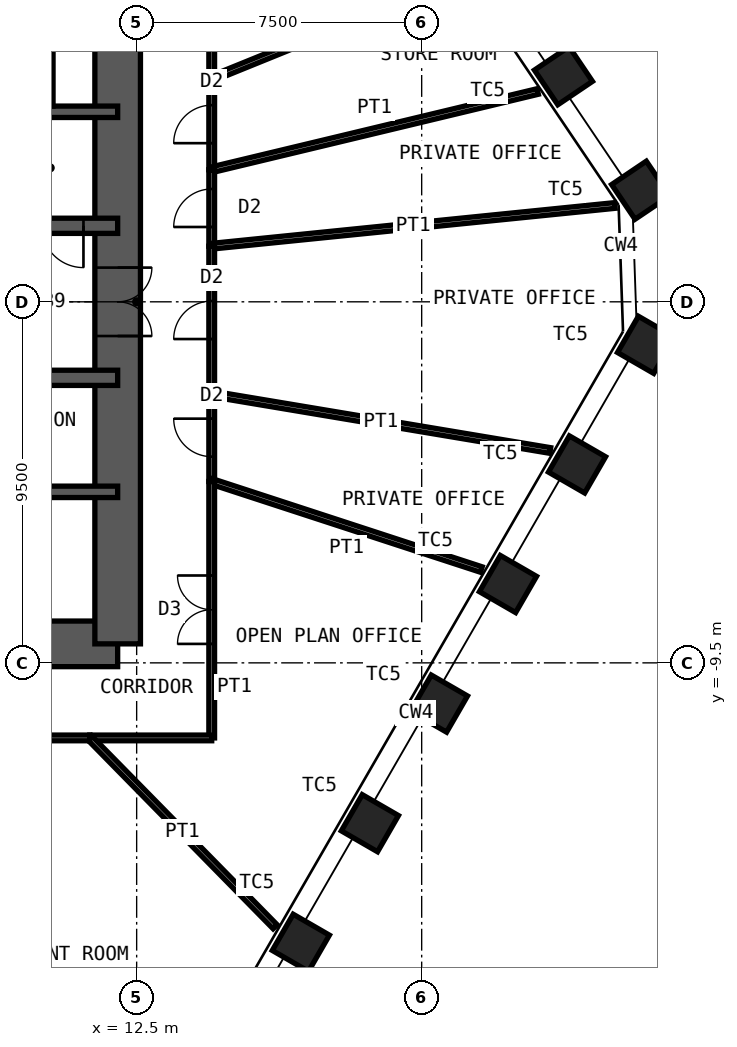
"""IFC4 building model, lengths in metres.
Left out: names, types, materials, properties, quantities, classifications, styles, units other than length and angle.
Written with IfcOpenShell. Run it as: python <this file> out.ifc"""

import sys

from ifc_helpers import new_model, si_unit, direction, frame, frame_2d, origin, origin_2d, place, context, subcontext, project, spatial, rectangle, hollow_rectangle, extrude, element, fill, save


model = new_model("IFC4")
c1 = context("Model", 3, precision=1e-05, world=origin(), true_north=direction((0.0, 1.0)))
c2 = subcontext(c1, "Body", "Model", "MODEL_VIEW")
j1 = project(units=[si_unit("LENGTHUNIT", "METRE"), si_unit("PLANEANGLEUNIT", "RADIAN")], contexts=[c1])
p1 = place(None, origin())
s1 = spatial("IfcSite", under=j1, at=p1, CompositionType="ELEMENT")
p2 = place(p1, origin())
s2 = spatial("IfcBuilding", under=s1, at=p2, CompositionType="ELEMENT")
p3 = place(p2, frame((0.0, 0.0, 214.0)))
s3 = spatial("IfcBuildingStorey", under=s2, at=p3, CompositionType="ELEMENT", Elevation=214.0)
for number, where, z_axis, x_axis in (
    (1, (23.731, 5.948, 0.0), (0.0, 0.0, 1.0), (-0.559, 0.829, 0.0)),
    (2, (25.762, 2.936, 0.0), (0.0, 0.0, 1.0), (-0.559, 0.829, 0.0)),
    (3, (25.905, -1.132, 0.0), (0.0, 0.0, 1.0), (0.5, 0.866, 0.0)),
    (4, (24.088, -4.279, 0.0), (0.0, 0.0, 1.0), (0.5, 0.866, 0.0)),
    (5, (22.271, -7.426, 0.0), (0.0, 0.0, 1.0), (0.5, 0.866, 0.0)),
    (6, (20.454, -10.572, 0.0), (0.0, 0.0, 1.0), (0.5, 0.866, 0.0)),
    (7, (18.637, -13.719, 0.0), (0.0, 0.0, 1.0), (0.5, 0.866, 0.0)),
    (8, (16.821, -16.866, 0.0), (0.0, 0.0, 1.0), (0.5, 0.866, 0.0)),
):
    element("IfcColumn", number, at=place(p3, frame(where, z_axis=z_axis, x_axis=x_axis)), inside=s3, PredefinedType="COLUMN", context=c2, shape_type="SweptSolid", body=[
        extrude(hollow_rectangle(XDim=1.1, YDim=1.1, WallThickness=0.07, at=origin_2d()), origin(), (0.0, 0.0, 1.0), 4.2),
    ])
p4 = place(p3, frame((-12.0, -9.0, 0.0), z_axis=(0.0, 0.0, 1.0), x_axis=(1.0, 0.0, 0.0)))
e9 = element("IfcWall", 9, at=p4, inside=s3, PredefinedType="SHEAR", context=c2, shape_type="SweptSolid", body=[
    extrude(rectangle(XDim=24.0, YDim=1.2, at=frame_2d((12.0, 0.0))), origin(), (0.0, 0.0, 1.0), 4.2),
])
p5 = place(p4, frame((1.35, 0.0, 0.0)))
e10 = element("IfcOpeningElement", 10, at=p5, cuts=e9, PredefinedType="OPENING", context=c2, shape_type="SweptSolid", body=[
    extrude(rectangle(XDim=1.0, YDim=2.1, at=frame_2d((0.5, 1.05))), frame((0.0, 0.61, 0.0), z_axis=(0.0, -1.0, 0.0), x_axis=(1.0, 0.0, 0.0)), (0.0, 0.0, 1.0), 1.22),
])
p6 = place(p4, frame((5.325, 0.0, 0.0)))
e11 = element("IfcOpeningElement", 11, at=p6, cuts=e9, PredefinedType="OPENING", context=c2, shape_type="SweptSolid", body=[
    extrude(rectangle(XDim=1.15, YDim=2.1, at=frame_2d((0.575, 1.05))), frame((0.0, 0.61, 0.0), z_axis=(0.0, -1.0, 0.0), x_axis=(1.0, 0.0, 0.0)), (0.0, 0.0, 1.0), 1.22),
])
p7 = place(p4, frame((12.6, 0.0, 0.0)))
e12 = element("IfcOpeningElement", 12, at=p7, cuts=e9, PredefinedType="OPENING", context=c2, shape_type="SweptSolid", body=[
    extrude(rectangle(XDim=1.0, YDim=2.1, at=frame_2d((0.5, 1.05))), frame((0.0, 0.61, 0.0), z_axis=(0.0, -1.0, 0.0), x_axis=(1.0, 0.0, 0.0)), (0.0, 0.0, 1.0), 1.22),
])
p8 = place(p3, frame((12.0, -9.0, 0.0), z_axis=(0.0, 0.0, 1.0), x_axis=(0.0, 1.0, 0.0)))
e13 = element("IfcWall", 13, at=p8, inside=s3, PredefinedType="SHEAR", context=c2, shape_type="SweptSolid", body=[
    extrude(rectangle(XDim=18.0, YDim=1.2, at=frame_2d((9.0, 0.0))), origin(), (0.0, 0.0, 1.0), 4.2),
])
p9 = place(p8, frame((8.1, 0.0, 0.0)))
e14 = element("IfcOpeningElement", 14, at=p9, cuts=e13, PredefinedType="OPENING", context=c2, shape_type="SweptSolid", body=[
    extrude(rectangle(XDim=1.8, YDim=2.1, at=frame_2d((0.9, 1.05))), frame((0.0, 0.61, 0.0), z_axis=(0.0, -1.0, 0.0), x_axis=(1.0, 0.0, 0.0)), (0.0, 0.0, 1.0), 1.22),
])
p10 = place(p3, frame((-12.0, 5.0, 0.0), z_axis=(0.0, 0.0, 1.0), x_axis=(1.0, 0.0, 0.0)))
e15 = element("IfcWall", 15, at=p10, inside=s3, PredefinedType="SHEAR", context=c2, shape_type="SweptSolid", body=[
    extrude(rectangle(XDim=24.0, YDim=0.3, at=frame_2d((12.0, 0.0))), origin(), (0.0, 0.0, 1.0), 4.2),
])
p11 = place(p3, frame((-12.0, 2.0, 0.0), z_axis=(0.0, 0.0, 1.0), x_axis=(1.0, 0.0, 0.0)))
e16 = element("IfcWall", 16, at=p11, inside=s3, PredefinedType="SHEAR", context=c2, shape_type="SweptSolid", body=[
    extrude(rectangle(XDim=24.0, YDim=0.4, at=frame_2d((12.0, 0.0))), origin(), (0.0, 0.0, 1.0), 4.2),
])
p12 = place(p11, frame((2.4, 0.0, 0.0)))
e17 = element("IfcOpeningElement", 17, at=p12, cuts=e16, PredefinedType="OPENING", context=c2, shape_type="SweptSolid", body=[
    extrude(rectangle(XDim=1.1, YDim=2.1, at=frame_2d((0.55, 1.05))), frame((0.0, 0.21, 0.0), z_axis=(0.0, -1.0, 0.0), x_axis=(1.0, 0.0, 0.0)), (0.0, 0.0, 1.0), 0.42),
])
p13 = place(p11, frame((22.0, 0.0, 0.0)))
e18 = element("IfcOpeningElement", 18, at=p13, cuts=e16, PredefinedType="OPENING", context=c2, shape_type="SweptSolid", body=[
    extrude(rectangle(XDim=1.1, YDim=2.1, at=frame_2d((0.55, 1.05))), frame((0.0, 0.21, 0.0), z_axis=(0.0, -1.0, 0.0), x_axis=(1.0, 0.0, 0.0)), (0.0, 0.0, 1.0), 0.42),
])
p14 = place(p11, frame((10.15, 0.0, 0.0)))
e19 = element("IfcOpeningElement", 19, at=p14, cuts=e16, PredefinedType="OPENING", context=c2, shape_type="SweptSolid", body=[
    extrude(rectangle(XDim=1.0, YDim=2.1, at=frame_2d((0.5, 1.05))), frame((0.0, 0.21, 0.0), z_axis=(0.0, -1.0, 0.0), x_axis=(1.0, 0.0, 0.0)), (0.0, 0.0, 1.0), 0.42),
])
p15 = place(p11, frame((6.9, 0.0, 0.0)))
e20 = element("IfcOpeningElement", 20, at=p15, cuts=e16, PredefinedType="OPENING", context=c2, shape_type="SweptSolid", body=[
    extrude(rectangle(XDim=1.0, YDim=2.1, at=frame_2d((0.5, 1.05))), frame((0.0, 0.21, 0.0), z_axis=(0.0, -1.0, 0.0), x_axis=(1.0, 0.0, 0.0)), (0.0, 0.0, 1.0), 0.42),
])
p16 = place(p11, frame((13.35, 0.0, 0.0)))
e21 = element("IfcOpeningElement", 21, at=p16, cuts=e16, PredefinedType="OPENING", context=c2, shape_type="SweptSolid", body=[
    extrude(rectangle(XDim=1.1, YDim=2.4, at=frame_2d((0.55, 1.2))), frame((0.0, 0.21, 0.0), z_axis=(0.0, -1.0, 0.0), x_axis=(1.0, 0.0, 0.0)), (0.0, 0.0, 1.0), 0.42),
])
p17 = place(p11, frame((16.15, 0.0, 0.0)))
e22 = element("IfcOpeningElement", 22, at=p17, cuts=e16, PredefinedType="OPENING", context=c2, shape_type="SweptSolid", body=[
    extrude(rectangle(XDim=1.1, YDim=2.4, at=frame_2d((0.55, 1.2))), frame((0.0, 0.21, 0.0), z_axis=(0.0, -1.0, 0.0), x_axis=(1.0, 0.0, 0.0)), (0.0, 0.0, 1.0), 0.42),
])
p18 = place(p11, frame((18.95, 0.0, 0.0)))
e23 = element("IfcOpeningElement", 23, at=p18, cuts=e16, PredefinedType="OPENING", context=c2, shape_type="SweptSolid", body=[
    extrude(rectangle(XDim=1.1, YDim=2.4, at=frame_2d((0.55, 1.2))), frame((0.0, 0.21, 0.0), z_axis=(0.0, -1.0, 0.0), x_axis=(1.0, 0.0, 0.0)), (0.0, 0.0, 1.0), 0.42),
])
p19 = place(p3, frame((-12.0, -2.0, 0.0), z_axis=(0.0, 0.0, 1.0), x_axis=(1.0, 0.0, 0.0)))
e24 = element("IfcWall", 24, at=p19, inside=s3, PredefinedType="SHEAR", context=c2, shape_type="SweptSolid", body=[
    extrude(rectangle(XDim=24.0, YDim=0.4, at=frame_2d((12.0, 0.0))), origin(), (0.0, 0.0, 1.0), 4.2),
])
p20 = place(p19, frame((1.1, 0.0, 0.0)))
e25 = element("IfcOpeningElement", 25, at=p20, cuts=e24, PredefinedType="OPENING", context=c2, shape_type="SweptSolid", body=[
    extrude(rectangle(XDim=1.1, YDim=2.1, at=frame_2d((0.55, 1.05))), frame((0.0, 0.21, 0.0), z_axis=(0.0, -1.0, 0.0), x_axis=(1.0, 0.0, 0.0)), (0.0, 0.0, 1.0), 0.42),
])
p21 = place(p19, frame((13.55, 0.0, 0.0)))
e26 = element("IfcOpeningElement", 26, at=p21, cuts=e24, PredefinedType="OPENING", context=c2, shape_type="SweptSolid", body=[
    extrude(rectangle(XDim=1.1, YDim=2.1, at=frame_2d((0.55, 1.05))), frame((0.0, 0.21, 0.0), z_axis=(0.0, -1.0, 0.0), x_axis=(1.0, 0.0, 0.0)), (0.0, 0.0, 1.0), 0.42),
])
p22 = place(p19, frame((20.7, 0.0, 0.0)))
e27 = element("IfcOpeningElement", 27, at=p22, cuts=e24, PredefinedType="OPENING", context=c2, shape_type="SweptSolid", body=[
    extrude(rectangle(XDim=1.1, YDim=2.1, at=frame_2d((0.55, 1.05))), frame((0.0, 0.21, 0.0), z_axis=(0.0, -1.0, 0.0), x_axis=(1.0, 0.0, 0.0)), (0.0, 0.0, 1.0), 0.42),
])
p23 = place(p19, frame((4.0, 0.0, 0.0)))
e28 = element("IfcOpeningElement", 28, at=p23, cuts=e24, PredefinedType="OPENING", context=c2, shape_type="SweptSolid", body=[
    extrude(rectangle(XDim=1.0, YDim=2.1, at=frame_2d((0.5, 1.05))), frame((0.0, 0.21, 0.0), z_axis=(0.0, -1.0, 0.0), x_axis=(1.0, 0.0, 0.0)), (0.0, 0.0, 1.0), 0.42),
])
p24 = place(p19, frame((6.8, 0.0, 0.0)))
e29 = element("IfcOpeningElement", 29, at=p24, cuts=e24, PredefinedType="OPENING", context=c2, shape_type="SweptSolid", body=[
    extrude(rectangle(XDim=1.0, YDim=2.1, at=frame_2d((0.5, 1.05))), frame((0.0, 0.21, 0.0), z_axis=(0.0, -1.0, 0.0), x_axis=(1.0, 0.0, 0.0)), (0.0, 0.0, 1.0), 0.42),
])
p25 = place(p3, frame((-12.0, -5.0, 0.0), z_axis=(0.0, 0.0, 1.0), x_axis=(1.0, 0.0, 0.0)))
e30 = element("IfcWall", 30, at=p25, inside=s3, PredefinedType="SHEAR", context=c2, shape_type="SweptSolid", body=[
    extrude(rectangle(XDim=24.0, YDim=0.3, at=frame_2d((12.0, 0.0))), origin(), (0.0, 0.0, 1.0), 4.2),
])
p26 = place(p3, frame((10.25, 5.15, 0.0), z_axis=(0.0, 0.0, 1.0), x_axis=(0.0, 1.0, 0.0)))
e31 = element("IfcWall", 31, at=p26, inside=s3, PredefinedType="PARTITIONING", context=c2, shape_type="SweptSolid", body=[
    extrude(rectangle(XDim=1.5, YDim=0.1, at=frame_2d((0.75, 0.0))), origin(), (0.0, 0.0, 1.0), 2.1),
])
p27 = place(p3, frame((14.475, 11.475, 0.0), z_axis=(0.0, 0.0, 1.0), x_axis=(0.0, -1.0, 0.0)))
e32 = element("IfcWall", 32, at=p27, inside=s3, PredefinedType="PARTITIONING", context=c2, shape_type="SweptSolid", body=[
    extrude(rectangle(XDim=5.601, YDim=0.15, at=frame_2d((2.801, 0.0))), origin(), (0.0, 0.0, 1.0), 4.03),
])
p28 = place(p27, frame((1.901, 0.0, 0.0)))
e33 = element("IfcOpeningElement", 33, at=p28, cuts=e32, PredefinedType="OPENING", context=c2, shape_type="SweptSolid", body=[
    extrude(rectangle(XDim=1.8, YDim=2.4, at=frame_2d((0.9, 1.2))), frame((0.0, 0.085, 0.0), z_axis=(0.0, -1.0, 0.0), x_axis=(1.0, 0.0, 0.0)), (0.0, 0.0, 1.0), 0.17),
])
p29 = place(p3, frame((21.026, 8.532, 0.0), z_axis=(0.0, 0.0, 1.0), x_axis=(-0.926617028548, -0.376006492503, 0.0)))
e34 = element("IfcWall", 34, at=p29, inside=s3, PredefinedType="PARTITIONING", context=c2, shape_type="SweptSolid", body=[
    extrude(rectangle(XDim=7.07, YDim=0.15, at=frame_2d((3.535, 0.0))), origin(), (0.0, 0.0, 1.0), 3.43),
])
p30 = place(p3, frame((14.475, 5.874, 0.0), z_axis=(0.0, 0.0, 1.0), x_axis=(0.0, -1.0, 0.0)))
e35 = element("IfcWall", 35, at=p30, inside=s3, PredefinedType="PARTITIONING", context=c2, shape_type="SweptSolid", body=[
    extrude(rectangle(XDim=2.399, YDim=0.15, at=frame_2d((1.2, 0.0))), origin(), (0.0, 0.0, 1.0), 4.03),
])
p31 = place(p30, frame((0.699, 0.0, 0.0)))
e36 = element("IfcOpeningElement", 36, at=p31, cuts=e35, PredefinedType="OPENING", context=c2, shape_type="SweptSolid", body=[
    extrude(rectangle(XDim=1.0, YDim=2.4, at=frame_2d((0.5, 1.2))), frame((0.0, 0.085, 0.0), z_axis=(0.0, -1.0, 0.0), x_axis=(1.0, 0.0, 0.0)), (0.0, 0.0, 1.0), 0.17),
])
p32 = place(p3, frame((23.053, 5.534, 0.0), z_axis=(0.0, 0.0, 1.0), x_axis=(-0.972377252501, -0.233414821335, 0.0)))
e37 = element("IfcWall", 37, at=p32, inside=s3, PredefinedType="PARTITIONING", context=c2, shape_type="SweptSolid", body=[
    extrude(rectangle(XDim=8.822, YDim=0.15, at=frame_2d((4.411, 0.0))), origin(), (0.0, 0.0, 1.0), 3.43),
])
p33 = place(p3, frame((14.475, 3.475, 0.0), z_axis=(0.0, 0.0, 1.0), x_axis=(0.0, -1.0, 0.0)))
e38 = element("IfcWall", 38, at=p33, inside=s3, PredefinedType="PARTITIONING", context=c2, shape_type="SweptSolid", body=[
    extrude(rectangle(XDim=2.012, YDim=0.15, at=frame_2d((1.006, 0.0))), origin(), (0.0, 0.0, 1.0), 4.03),
])
p34 = place(p33, frame((0.506, 0.0, 0.0)))
e39 = element("IfcOpeningElement", 39, at=p34, cuts=e38, PredefinedType="OPENING", context=c2, shape_type="SweptSolid", body=[
    extrude(rectangle(XDim=1.0, YDim=2.4, at=frame_2d((0.5, 1.2))), frame((0.0, 0.085, 0.0), z_axis=(0.0, -1.0, 0.0), x_axis=(1.0, 0.0, 0.0)), (0.0, 0.0, 1.0), 0.17),
])
p35 = place(p3, frame((25.083, 2.535, 0.0), z_axis=(0.0, 0.0, 1.0), x_axis=(-0.994932122767, -0.10054884925, 0.0)))
e40 = element("IfcWall", 40, at=p35, inside=s3, PredefinedType="PARTITIONING", context=c2, shape_type="SweptSolid", body=[
    extrude(rectangle(XDim=10.662, YDim=0.15, at=frame_2d((5.331, 0.0))), origin(), (0.0, 0.0, 1.0), 2.93),
])
p36 = place(p3, frame((14.475, 1.463, 0.0), z_axis=(0.0, 0.0, 1.0), x_axis=(0.0, -1.0, 0.0)))
e41 = element("IfcWall", 41, at=p36, inside=s3, PredefinedType="PARTITIONING", context=c2, shape_type="SweptSolid", body=[
    extrude(rectangle(XDim=3.885, YDim=0.15, at=frame_2d((1.942, 0.0))), origin(), (0.0, 0.0, 1.0), 4.03),
])
p37 = place(p36, frame((1.442, 0.0, 0.0)))
e42 = element("IfcOpeningElement", 42, at=p37, cuts=e41, PredefinedType="OPENING", context=c2, shape_type="SweptSolid", body=[
    extrude(rectangle(XDim=1.0, YDim=2.4, at=frame_2d((0.5, 1.2))), frame((0.0, 0.085, 0.0), z_axis=(0.0, -1.0, 0.0), x_axis=(1.0, 0.0, 0.0)), (0.0, 0.0, 1.0), 0.17),
])
p38 = place(p3, frame((23.383, -3.912, 0.0), z_axis=(0.0, 0.0, 1.0), x_axis=(-0.986293651891, 0.164999491631, 0.0)))
e43 = element("IfcWall", 43, at=p38, inside=s3, PredefinedType="PARTITIONING", context=c2, shape_type="SweptSolid", body=[
    extrude(rectangle(XDim=9.032, YDim=0.15, at=frame_2d((4.516, 0.0))), origin(), (0.0, 0.0, 1.0), 3.43),
])
p39 = place(p3, frame((14.475, -2.422, 0.0), z_axis=(0.0, 0.0, 1.0), x_axis=(0.0, -1.0, 0.0)))
e44 = element("IfcWall", 44, at=p39, inside=s3, PredefinedType="PARTITIONING", context=c2, shape_type="SweptSolid", body=[
    extrude(rectangle(XDim=2.305, YDim=0.15, at=frame_2d((1.153, 0.0))), origin(), (0.0, 0.0, 1.0), 4.03),
])
p40 = place(p39, frame((0.653, 0.0, 0.0)))
e45 = element("IfcOpeningElement", 45, at=p40, cuts=e44, PredefinedType="OPENING", context=c2, shape_type="SweptSolid", body=[
    extrude(rectangle(XDim=1.0, YDim=2.4, at=frame_2d((0.5, 1.2))), frame((0.0, 0.085, 0.0), z_axis=(0.0, -1.0, 0.0), x_axis=(1.0, 0.0, 0.0)), (0.0, 0.0, 1.0), 0.17),
])
p41 = place(p3, frame((21.57, -7.044, 0.0), z_axis=(0.0, 0.0, 1.0), x_axis=(-0.950585953502, 0.310461503258, 0.0)))
e46 = element("IfcWall", 46, at=p41, inside=s3, PredefinedType="PARTITIONING", context=c2, shape_type="SweptSolid", body=[
    extrude(rectangle(XDim=7.464, YDim=0.15, at=frame_2d((3.732, 0.0))), origin(), (0.0, 0.0, 1.0), 3.43),
])
p42 = place(p3, frame((14.475, -4.727, 0.0), z_axis=(0.0, 0.0, 1.0), x_axis=(0.0, -1.0, 0.0)))
e47 = element("IfcWall", 47, at=p42, inside=s3, PredefinedType="PARTITIONING", context=c2, shape_type="SweptSolid", body=[
    extrude(rectangle(XDim=6.748, YDim=0.15, at=frame_2d((3.374, 0.0))), origin(), (0.0, 0.0, 1.0), 4.03),
])
p43 = place(p42, frame((2.474, 0.0, 0.0)))
e48 = element("IfcOpeningElement", 48, at=p43, cuts=e47, PredefinedType="OPENING", context=c2, shape_type="SweptSolid", body=[
    extrude(rectangle(XDim=1.8, YDim=2.4, at=frame_2d((0.9, 1.2))), frame((0.0, 0.085, 0.0), z_axis=(0.0, -1.0, 0.0), x_axis=(1.0, 0.0, 0.0)), (0.0, 0.0, 1.0), 0.17),
])
p44 = place(p3, frame((14.475, -11.475, 0.0), z_axis=(0.0, 0.0, 1.0), x_axis=(-1.0, 0.0, 0.0)))
e49 = element("IfcWall", 49, at=p44, inside=s3, PredefinedType="PARTITIONING", context=c2, shape_type="SweptSolid", body=[
    extrude(rectangle(XDim=3.209, YDim=0.15, at=frame_2d((1.605, 0.0))), origin(), (0.0, 0.0, 1.0), 4.03),
])
p45 = place(p3, frame((16.145, -16.444, 0.0), z_axis=(0.0, 0.0, 1.0), x_axis=(-0.700591378209, 0.71356269576, 0.0)))
e50 = element("IfcWall", 50, at=p45, inside=s3, PredefinedType="PARTITIONING", context=c2, shape_type="SweptSolid", body=[
    extrude(rectangle(XDim=6.964, YDim=0.15, at=frame_2d((3.482, 0.0))), origin(), (0.0, 0.0, 1.0), 3.43),
])
p46 = place(p3, frame((11.266, -11.475, 0.0), z_axis=(0.0, 0.0, 1.0), x_axis=(-1.0, 0.0, 0.0)))
e51 = element("IfcWall", 51, at=p46, inside=s3, PredefinedType="PARTITIONING", context=c2, shape_type="SweptSolid", body=[
    extrude(rectangle(XDim=7.196, YDim=0.15, at=frame_2d((3.598, 0.0))), origin(), (0.0, 0.0, 1.0), 4.03),
])
p47 = place(p46, frame((3.098, 0.0, 0.0)))
e52 = element("IfcOpeningElement", 52, at=p47, cuts=e51, PredefinedType="OPENING", context=c2, shape_type="SweptSolid", body=[
    extrude(rectangle(XDim=1.0, YDim=2.4, at=frame_2d((0.5, 1.2))), frame((0.0, 0.085, 0.0), z_axis=(0.0, -1.0, 0.0), x_axis=(1.0, 0.0, 0.0)), (0.0, 0.0, 1.0), 0.17),
])
p48 = place(p13, origin())
e53 = element("IfcDoor", 53, at=p48, inside=s3, OperationType="SINGLE_SWING_RIGHT", PredefinedType="DOOR", context=c2, shape_type="SweptSolid", body=[
    extrude(rectangle(XDim=1.1, YDim=2.1, at=frame_2d((0.55, 1.05))), frame((0.0, 0.025, 0.0), z_axis=(0.0, -1.0, 0.0), x_axis=(1.0, 0.0, 0.0)), (0.0, 0.0, 1.0), 0.05),
])
fill(e18, e53)
p49 = place(p9, origin())
e54 = element("IfcDoor", 54, at=p49, inside=s3, OperationType="DOUBLE_DOOR_DOUBLE_SWING", PredefinedType="DOOR", context=c2, shape_type="SweptSolid", body=[
    extrude(rectangle(XDim=1.8, YDim=2.1, at=frame_2d((0.9, 1.05))), frame((0.0, 0.025, 0.0), z_axis=(0.0, -1.0, 0.0), x_axis=(1.0, 0.0, 0.0)), (0.0, 0.0, 1.0), 0.05),
])
fill(e14, e54)
p50 = place(p31, origin())
e55 = element("IfcDoor", 55, at=p50, inside=s3, OperationType="SINGLE_SWING_RIGHT", PredefinedType="DOOR", context=c2, shape_type="SweptSolid", body=[
    extrude(rectangle(XDim=1.0, YDim=2.4, at=frame_2d((0.5, 1.2))), frame((0.0, 0.025, 0.0), z_axis=(0.0, -1.0, 0.0), x_axis=(1.0, 0.0, 0.0)), (0.0, 0.0, 1.0), 0.05),
])
fill(e36, e55)
p51 = place(p34, origin())
e56 = element("IfcDoor", 56, at=p51, inside=s3, OperationType="SINGLE_SWING_RIGHT", PredefinedType="DOOR", context=c2, shape_type="SweptSolid", body=[
    extrude(rectangle(XDim=1.0, YDim=2.4, at=frame_2d((0.5, 1.2))), frame((0.0, 0.025, 0.0), z_axis=(0.0, -1.0, 0.0), x_axis=(1.0, 0.0, 0.0)), (0.0, 0.0, 1.0), 0.05),
])
fill(e39, e56)
p52 = place(p37, origin())
e57 = element("IfcDoor", 57, at=p52, inside=s3, OperationType="SINGLE_SWING_RIGHT", PredefinedType="DOOR", context=c2, shape_type="SweptSolid", body=[
    extrude(rectangle(XDim=1.0, YDim=2.4, at=frame_2d((0.5, 1.2))), frame((0.0, 0.025, 0.0), z_axis=(0.0, -1.0, 0.0), x_axis=(1.0, 0.0, 0.0)), (0.0, 0.0, 1.0), 0.05),
])
fill(e42, e57)
p53 = place(p40, origin())
e58 = element("IfcDoor", 58, at=p53, inside=s3, OperationType="SINGLE_SWING_LEFT", PredefinedType="DOOR", context=c2, shape_type="SweptSolid", body=[
    extrude(rectangle(XDim=1.0, YDim=2.4, at=frame_2d((0.5, 1.2))), frame((0.0, 0.025, 0.0), z_axis=(0.0, -1.0, 0.0), x_axis=(1.0, 0.0, 0.0)), (0.0, 0.0, 1.0), 0.05),
])
fill(e45, e58)
p54 = place(p43, origin())
e59 = element("IfcDoor", 59, at=p54, inside=s3, OperationType="DOUBLE_DOOR_DOUBLE_SWING", PredefinedType="DOOR", context=c2, shape_type="SweptSolid", body=[
    extrude(rectangle(XDim=1.8, YDim=2.4, at=frame_2d((0.9, 1.2))), frame((0.0, 0.025, 0.0), z_axis=(0.0, -1.0, 0.0), x_axis=(1.0, 0.0, 0.0)), (0.0, 0.0, 1.0), 0.05),
])
fill(e48, e59)
save(model, sys.argv[1])
